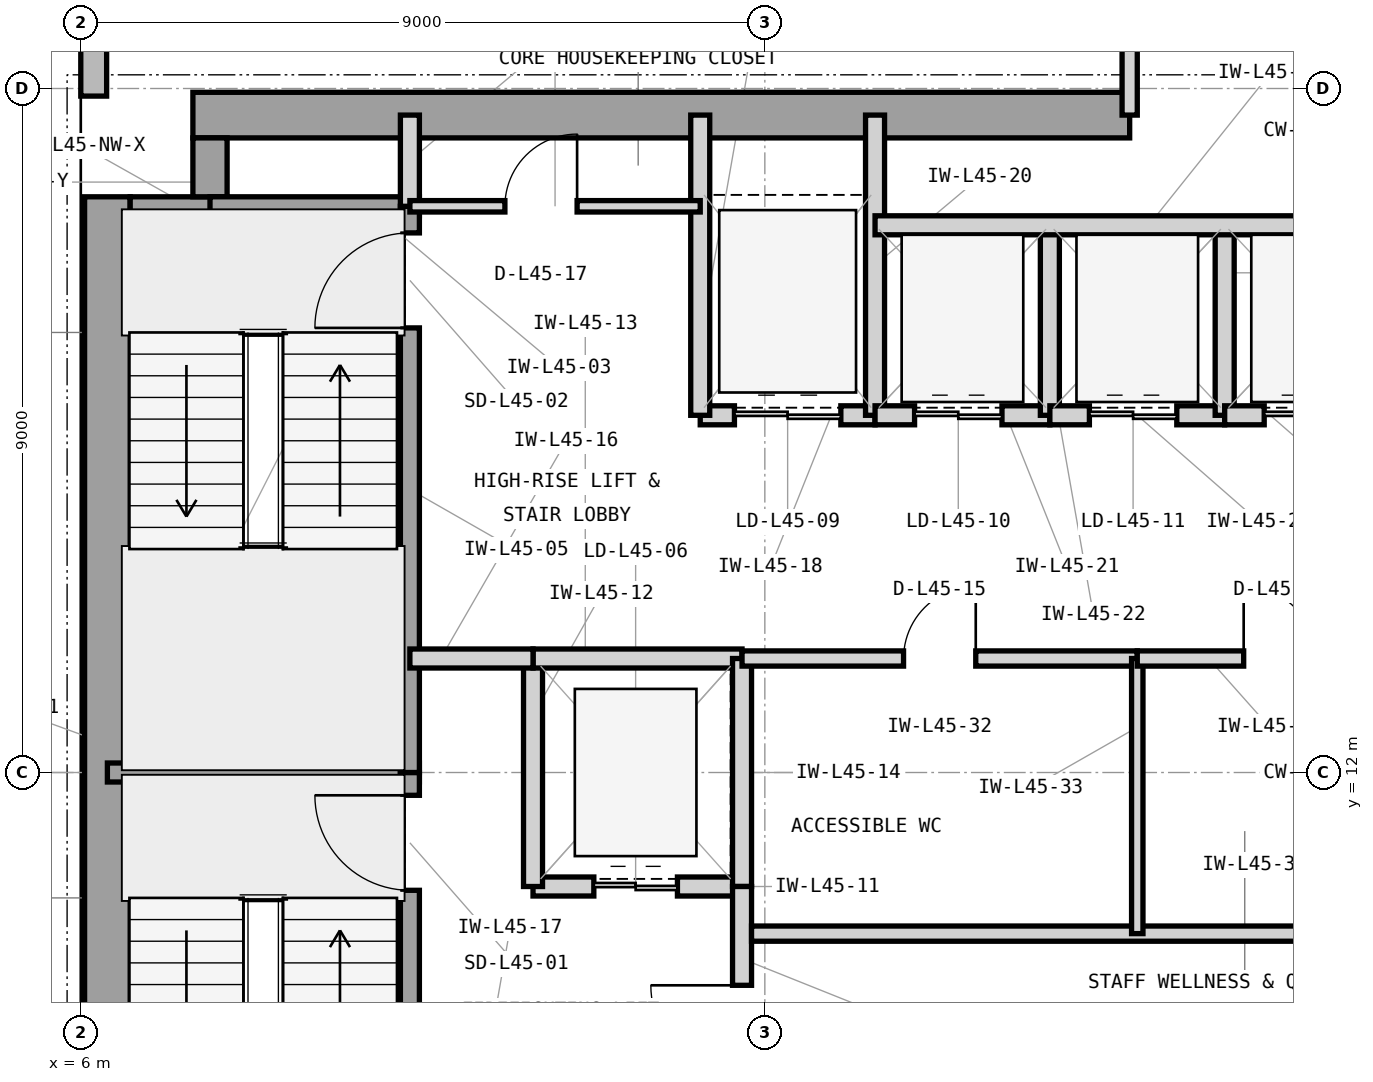
"""IFC4 building model, lengths in metres.
Left out: names, types, materials, properties, quantities, classifications, styles, units other than length and angle.
Written with IfcOpenShell. Run it as: python <this file> out.ifc"""

import sys

from ifc_helpers import new_model, si_unit, direction, frame, frame_2d, origin, place, context, subcontext, project, spatial, rectangle, extrude, element, fill, save


model = new_model("IFC4")
c1 = context("Model", 3, precision=1e-05, world=origin(), true_north=direction((0.0, 1.0)))
c2 = subcontext(c1, "Body", "Model", "MODEL_VIEW")
j1 = project(units=[si_unit("LENGTHUNIT", "METRE"), si_unit("PLANEANGLEUNIT", "RADIAN")], contexts=[c1])
p1 = place(None, origin())
s1 = spatial("IfcSite", under=j1, at=p1, CompositionType="ELEMENT")
p2 = place(p1, origin())
s2 = spatial("IfcBuilding", under=s1, at=p2, CompositionType="ELEMENT")
p3 = place(p2, frame((0.0, 0.0, 187.8)))
s3 = spatial("IfcBuildingStorey", under=s2, at=p3, CompositionType="ELEMENT", Elevation=187.8)
p4 = place(p3, frame((6.35, 4.425, 0.0), z_axis=(0.0, 0.0, 1.0), x_axis=(0.0, 1.0, 0.0)))
e1 = element("IfcWall", 1, at=p4, inside=s3, PredefinedType="SHEAR", context=c2, shape_type="SweptSolid", body=[
    extrude(rectangle(XDim=15.15, YDim=0.6, at=frame_2d((7.575, 0.0))), origin(), (0.0, 0.0, 1.0), 3.9),
])
p5 = place(p3, frame((7.475, 20.65, 0.0), z_axis=(0.0, 0.0, 1.0), x_axis=(1.0, 0.0, 0.0)))
e2 = element("IfcWall", 2, at=p5, inside=s3, PredefinedType="SHEAR", context=c2, shape_type="SweptSolid", body=[
    extrude(rectangle(XDim=12.325, YDim=0.6, at=frame_2d((6.163, 0.0))), origin(), (0.0, 0.0, 1.0), 3.9),
])
p6 = place(p3, frame((6.65, 19.35, 0.0), z_axis=(0.0, 0.0, 1.0), x_axis=(1.0, 0.0, 0.0)))
e3 = element("IfcWall", 3, at=p6, inside=s3, PredefinedType="SHEAR", context=c2, shape_type="SweptSolid", body=[
    extrude(rectangle(XDim=1.275, YDim=0.45, at=frame_2d((0.638, 0.0))), origin(), (0.0, 0.0, 1.0), 3.9),
])
p7 = place(p3, frame((7.7, 19.575, 0.0), z_axis=(0.0, 0.0, 1.0), x_axis=(0.0, 1.0, 0.0)))
e4 = element("IfcWall", 4, at=p7, inside=s3, PredefinedType="SHEAR", context=c2, shape_type="SweptSolid", body=[
    extrude(rectangle(XDim=0.775, YDim=0.45, at=frame_2d((0.388, 0.0))), origin(), (0.0, 0.0, 1.0), 3.9),
])
p8 = place(p3, frame((6.17, 43.4, 0.0), z_axis=(0.0, 0.0, 1.0), x_axis=(0.0, -1.0, 0.0)))
e5 = element("IfcWall", 5, at=p8, inside=s3, PredefinedType="STANDARD", context=c2, shape_type="SweptSolid", body=[
    extrude(rectangle(XDim=22.5, YDim=0.34, at=frame_2d((11.25, 0.0))), origin(), (0.0, 0.0, 1.0), 3.7),
])
p9 = place(p8, frame((10.1, 0.0, 0.9)))
e6 = element("IfcOpeningElement", 6, at=p9, cuts=e5, PredefinedType="OPENING", context=c2, shape_type="SweptSolid", body=[
    extrude(rectangle(XDim=2.3, YDim=2.2, at=frame_2d((1.15, 1.1))), frame((0.0, 0.18, 0.0), z_axis=(0.0, -1.0, 0.0), x_axis=(1.0, 0.0, 0.0)), (0.0, 0.0, 1.0), 0.36),
])
p10 = place(p3, frame((6.35, 12.0, 0.0), z_axis=(0.0, 0.0, 1.0), x_axis=(1.0, 0.0, 0.0)))
e7 = element("IfcWall", 7, at=p10, inside=s3, PredefinedType="SHEAR", context=c2, shape_type="SweptSolid", body=[
    extrude(rectangle(XDim=4.105, YDim=0.25, at=frame_2d((2.052, 0.0))), origin(), (0.0, 0.0, 1.0), 3.9),
])
p11 = place(p3, frame((7.7, 19.45, 0.0), z_axis=(0.0, 0.0, 1.0), x_axis=(1.0, 0.0, 0.0)))
e8 = element("IfcWall", 8, at=p11, inside=s3, PredefinedType="SHEAR", context=c2, shape_type="SweptSolid", body=[
    extrude(rectangle(XDim=2.755, YDim=0.25, at=frame_2d((1.377, 0.0))), origin(), (0.0, 0.0, 1.0), 3.9),
])
p12 = place(p3, frame((10.33, 4.55, 0.0), z_axis=(0.0, 0.0, 1.0), x_axis=(0.0, 1.0, 0.0)))
e9 = element("IfcWall", 9, at=p12, inside=s3, PredefinedType="SHEAR", context=c2, shape_type="SweptSolid", body=[
    extrude(rectangle(XDim=7.45, YDim=0.25, at=frame_2d((3.725, 0.0))), origin(), (0.0, 0.0, 1.0), 3.9),
])
p13 = place(p12, frame((5.9, 0.0, 0.0)))
e10 = element("IfcOpeningElement", 10, at=p13, cuts=e9, PredefinedType="OPENING", context=c2, shape_type="SweptSolid", body=[
    extrude(rectangle(XDim=1.25, YDim=2.2, at=frame_2d((0.625, 1.1))), frame((0.0, 0.135, 0.0), z_axis=(0.0, -1.0, 0.0), x_axis=(1.0, 0.0, 0.0)), (0.0, 0.0, 1.0), 0.27),
])
p14 = place(p3, frame((10.33, 12.0, 0.0), z_axis=(0.0, 0.0, 1.0), x_axis=(0.0, 1.0, 0.0)))
e11 = element("IfcWall", 11, at=p14, inside=s3, PredefinedType="SHEAR", context=c2, shape_type="SweptSolid", body=[
    extrude(rectangle(XDim=7.45, YDim=0.25, at=frame_2d((3.725, 0.0))), origin(), (0.0, 0.0, 1.0), 3.9),
])
p15 = place(p14, frame((5.85, 0.0, 0.0)))
e12 = element("IfcOpeningElement", 12, at=p15, cuts=e11, PredefinedType="OPENING", context=c2, shape_type="SweptSolid", body=[
    extrude(rectangle(XDim=1.25, YDim=2.2, at=frame_2d((0.625, 1.1))), frame((0.0, 0.135, 0.0), z_axis=(0.0, -1.0, 0.0), x_axis=(1.0, 0.0, 0.0)), (0.0, 0.0, 1.0), 0.27),
])
p16 = place(p3, frame((10.33, 19.45, 0.0), z_axis=(0.0, 0.0, 1.0), x_axis=(0.0, 1.0, 0.0)))
e13 = element("IfcWall", 13, at=p16, inside=s3, PredefinedType="PARTITIONING", context=c2, shape_type="SweptSolid", body=[
    extrude(rectangle(XDim=1.2, YDim=0.25, at=frame_2d((0.6, 0.0))), origin(), (0.0, 0.0, 1.0), 3.073),
])
p17 = place(p3, frame((11.95, 10.5, 0.0), z_axis=(0.0, 0.0, 1.0), x_axis=(1.0, 0.0, 0.0)))
e14 = element("IfcWall", 14, at=p17, inside=s3, PredefinedType="PARTITIONING", context=c2, shape_type="SweptSolid", body=[
    extrude(rectangle(XDim=2.75, YDim=0.25, at=frame_2d((1.375, 0.0))), origin(), (0.0, 0.0, 1.0), 3.283),
])
p18 = place(p17, frame((0.8, 0.0, 0.0)))
e15 = element("IfcOpeningElement", 15, at=p18, cuts=e14, PredefinedType="OPENING", context=c2, shape_type="SweptSolid", body=[
    extrude(rectangle(XDim=1.1, YDim=2.25, at=frame_2d((0.55, 1.125))), frame((0.0, 0.135, 0.0), z_axis=(0.0, -1.0, 0.0), x_axis=(1.0, 0.0, 0.0)), (0.0, 0.0, 1.0), 0.27),
])
p19 = place(p3, frame((11.95, 10.5, 0.0), z_axis=(0.0, 0.0, 1.0), x_axis=(0.0, 1.0, 0.0)))
e16 = element("IfcWall", 16, at=p19, inside=s3, PredefinedType="PARTITIONING", context=c2, shape_type="SweptSolid", body=[
    extrude(rectangle(XDim=3.0, YDim=0.25, at=frame_2d((1.5, 0.0))), origin(), (0.0, 0.0, 1.0), 3.69),
])
p20 = place(p3, frame((11.95, 13.5, 0.0), z_axis=(0.0, 0.0, 1.0), x_axis=(1.0, 0.0, 0.0)))
e17 = element("IfcWall", 17, at=p20, inside=s3, PredefinedType="PARTITIONING", context=c2, shape_type="SweptSolid", body=[
    extrude(rectangle(XDim=2.75, YDim=0.25, at=frame_2d((1.375, 0.0))), origin(), (0.0, 0.0, 1.0), 3.283),
])
p21 = place(p3, frame((14.7, 10.5, 0.0), z_axis=(0.0, 0.0, 1.0), x_axis=(0.0, 1.0, 0.0)))
e18 = element("IfcWall", 18, at=p21, inside=s3, PredefinedType="PARTITIONING", context=c2, shape_type="SweptSolid", body=[
    extrude(rectangle(XDim=3.0, YDim=0.25, at=frame_2d((1.5, 0.0))), origin(), (0.0, 0.0, 1.0), 3.69),
])
p22 = place(p3, frame((14.7, 6.7, 0.0), z_axis=(0.0, 0.0, 1.0), x_axis=(0.0, 1.0, 0.0)))
e19 = element("IfcWall", 19, at=p22, inside=s3, PredefinedType="PARTITIONING", context=c2, shape_type="SweptSolid", body=[
    extrude(rectangle(XDim=3.8, YDim=0.25, at=frame_2d((1.9, 0.0))), origin(), (0.0, 0.0, 1.0), 3.69),
])
p23 = place(p22, frame((1.3, 0.0, 0.0)))
e20 = element("IfcOpeningElement", 20, at=p23, cuts=e19, PredefinedType="OPENING", context=c2, shape_type="SweptSolid", body=[
    extrude(rectangle(XDim=1.2, YDim=2.2, at=frame_2d((0.6, 1.1))), frame((0.0, 0.135, 0.0), z_axis=(0.0, -1.0, 0.0), x_axis=(1.0, 0.0, 0.0)), (0.0, 0.0, 1.0), 0.27),
])
p24 = place(p3, frame((10.33, 13.5, 0.0), z_axis=(0.0, 0.0, 1.0), x_axis=(1.0, 0.0, 0.0)))
e21 = element("IfcWall", 21, at=p24, inside=s3, PredefinedType="PARTITIONING", context=c2, shape_type="SweptSolid", body=[
    extrude(rectangle(XDim=1.62, YDim=0.25, at=frame_2d((0.81, 0.0))), origin(), (0.0, 0.0, 1.0), 3.283),
])
p25 = place(p3, frame((14.15, 16.7, 0.0), z_axis=(0.0, 0.0, 1.0), x_axis=(1.0, 0.0, 0.0)))
e22 = element("IfcWall", 22, at=p25, inside=s3, PredefinedType="PARTITIONING", context=c2, shape_type="SweptSolid", body=[
    extrude(rectangle(XDim=2.3, YDim=0.25, at=frame_2d((1.15, 0.0))), origin(), (0.0, 0.0, 1.0), 3.283),
])
p26 = place(p25, frame((0.45, 0.0, 0.0)))
e23 = element("IfcOpeningElement", 23, at=p26, cuts=e22, PredefinedType="OPENING", context=c2, shape_type="SweptSolid", body=[
    extrude(rectangle(XDim=1.4, YDim=2.35, at=frame_2d((0.7, 1.175))), frame((0.0, 0.135, 0.0), z_axis=(0.0, -1.0, 0.0), x_axis=(1.0, 0.0, 0.0)), (0.0, 0.0, 1.0), 0.27),
])
for number, where, z_axis, x_axis in (
    (24, (14.15, 16.7, 0.0), (0.0, 0.0, 1.0), (0.0, 1.0, 0.0)),
    (25, (16.45, 16.7, 0.0), (0.0, 0.0, 1.0), (0.0, 1.0, 0.0)),
):
    element("IfcWall", number, at=place(p3, frame(where, z_axis=z_axis, x_axis=x_axis)), inside=s3, PredefinedType="PARTITIONING", context=c2, shape_type="SweptSolid", body=[
        extrude(rectangle(XDim=3.95, YDim=0.25, at=frame_2d((1.975, 0.0))), origin(), (0.0, 0.0, 1.0), 3.69),
    ])
p27 = place(p3, frame((16.45, 16.7, 0.0), z_axis=(0.0, 0.0, 1.0), x_axis=(1.0, 0.0, 0.0)))
e26 = element("IfcWall", 26, at=p27, inside=s3, PredefinedType="PARTITIONING", context=c2, shape_type="SweptSolid", body=[
    extrude(rectangle(XDim=2.3, YDim=0.25, at=frame_2d((1.15, 0.0))), origin(), (0.0, 0.0, 1.0), 3.283),
])
p28 = place(p27, frame((0.52, 0.0, 0.0)))
e27 = element("IfcOpeningElement", 27, at=p28, cuts=e26, PredefinedType="OPENING", context=c2, shape_type="SweptSolid", body=[
    extrude(rectangle(XDim=1.15, YDim=2.25, at=frame_2d((0.575, 1.125))), frame((0.0, 0.135, 0.0), z_axis=(0.0, -1.0, 0.0), x_axis=(1.0, 0.0, 0.0)), (0.0, 0.0, 1.0), 0.27),
])
p29 = place(p3, frame((18.75, 16.7, 0.0), z_axis=(0.0, 0.0, 1.0), x_axis=(0.0, 1.0, 0.0)))
e28 = element("IfcWall", 28, at=p29, inside=s3, PredefinedType="PARTITIONING", context=c2, shape_type="SweptSolid", body=[
    extrude(rectangle(XDim=2.5, YDim=0.25, at=frame_2d((1.25, 0.0))), origin(), (0.0, 0.0, 1.0), 3.69),
])
p30 = place(p3, frame((18.75, 16.7, 0.0), z_axis=(0.0, 0.0, 1.0), x_axis=(1.0, 0.0, 0.0)))
e29 = element("IfcWall", 29, at=p30, inside=s3, PredefinedType="PARTITIONING", context=c2, shape_type="SweptSolid", body=[
    extrude(rectangle(XDim=2.3, YDim=0.25, at=frame_2d((1.15, 0.0))), origin(), (0.0, 0.0, 1.0), 3.283),
])
p31 = place(p30, frame((0.52, 0.0, 0.0)))
e30 = element("IfcOpeningElement", 30, at=p31, cuts=e29, PredefinedType="OPENING", context=c2, shape_type="SweptSolid", body=[
    extrude(rectangle(XDim=1.15, YDim=2.25, at=frame_2d((0.575, 1.125))), frame((0.0, 0.135, 0.0), z_axis=(0.0, -1.0, 0.0), x_axis=(1.0, 0.0, 0.0)), (0.0, 0.0, 1.0), 0.27),
])
p32 = place(p3, frame((21.05, 16.7, 0.0), z_axis=(0.0, 0.0, 1.0), x_axis=(0.0, 1.0, 0.0)))
e31 = element("IfcWall", 31, at=p32, inside=s3, PredefinedType="PARTITIONING", context=c2, shape_type="SweptSolid", body=[
    extrude(rectangle(XDim=2.5, YDim=0.25, at=frame_2d((1.25, 0.0))), origin(), (0.0, 0.0, 1.0), 3.69),
])
p33 = place(p3, frame((21.05, 16.7, 0.0), z_axis=(0.0, 0.0, 1.0), x_axis=(1.0, 0.0, 0.0)))
e32 = element("IfcWall", 32, at=p33, inside=s3, PredefinedType="PARTITIONING", context=c2, shape_type="SweptSolid", body=[
    extrude(rectangle(XDim=2.4, YDim=0.25, at=frame_2d((1.2, 0.0))), origin(), (0.0, 0.0, 1.0), 3.283),
])
p34 = place(p33, frame((0.52, 0.0, 0.0)))
e33 = element("IfcOpeningElement", 33, at=p34, cuts=e32, PredefinedType="OPENING", context=c2, shape_type="SweptSolid", body=[
    extrude(rectangle(XDim=1.15, YDim=2.25, at=frame_2d((0.575, 1.125))), frame((0.0, 0.135, 0.0), z_axis=(0.0, -1.0, 0.0), x_axis=(1.0, 0.0, 0.0)), (0.0, 0.0, 1.0), 0.27),
])
p35 = place(p3, frame((16.45, 19.2, 0.0), z_axis=(0.0, 0.0, 1.0), x_axis=(1.0, 0.0, 0.0)))
e34 = element("IfcWall", 34, at=p35, inside=s3, PredefinedType="PARTITIONING", context=c2, shape_type="SweptSolid", body=[
    extrude(rectangle(XDim=7.2, YDim=0.25, at=frame_2d((3.6, 0.0))), origin(), (0.0, 0.0, 1.0), 3.69),
])
p36 = place(p3, frame((14.825, 9.88, 0.0), z_axis=(0.0, 0.0, 1.0), x_axis=(1.0, 0.0, 0.0)))
e35 = element("IfcWall", 35, at=p36, inside=s3, PredefinedType="PARTITIONING", context=c2, shape_type="SweptSolid", body=[
    extrude(rectangle(XDim=8.825, YDim=0.2, at=frame_2d((4.413, 0.0))), origin(), (0.0, 0.0, 1.0), 3.69),
])
p37 = place(p3, frame((14.7, 13.5, 0.0), z_axis=(0.0, 0.0, 1.0), x_axis=(1.0, 0.0, 0.0)))
e36 = element("IfcWall", 36, at=p37, inside=s3, PredefinedType="PARTITIONING", context=c2, shape_type="SweptSolid", body=[
    extrude(rectangle(XDim=5.2, YDim=0.2, at=frame_2d((2.6, 0.0))), origin(), (0.0, 0.0, 1.0), 3.283),
])
p38 = place(p37, frame((2.125, 0.0, 0.0)))
e37 = element("IfcOpeningElement", 37, at=p38, cuts=e36, PredefinedType="OPENING", context=c2, shape_type="SweptSolid", body=[
    extrude(rectangle(XDim=0.95, YDim=2.1, at=frame_2d((0.475, 1.05))), frame((0.0, 0.11, 0.0), z_axis=(0.0, -1.0, 0.0), x_axis=(1.0, 0.0, 0.0)), (0.0, 0.0, 1.0), 0.22),
])
p39 = place(p3, frame((19.9, 9.88, 0.0), z_axis=(0.0, 0.0, 1.0), x_axis=(0.0, 1.0, 0.0)))
e38 = element("IfcWall", 38, at=p39, inside=s3, PredefinedType="PARTITIONING", context=c2, shape_type="SweptSolid", body=[
    extrude(rectangle(XDim=3.62, YDim=0.15, at=frame_2d((1.81, 0.0))), origin(), (0.0, 0.0, 1.0), 3.69),
])
p40 = place(p3, frame((19.9, 13.5, 0.0), z_axis=(0.0, 0.0, 1.0), x_axis=(1.0, 0.0, 0.0)))
e39 = element("IfcWall", 39, at=p40, inside=s3, PredefinedType="PARTITIONING", context=c2, shape_type="SweptSolid", body=[
    extrude(rectangle(XDim=3.75, YDim=0.2, at=frame_2d((1.875, 0.0))), origin(), (0.0, 0.0, 1.0), 3.283),
])
p41 = place(p40, frame((1.4, 0.0, 0.0)))
e40 = element("IfcOpeningElement", 40, at=p41, cuts=e39, PredefinedType="OPENING", context=c2, shape_type="SweptSolid", body=[
    extrude(rectangle(XDim=0.95, YDim=2.1, at=frame_2d((0.475, 1.05))), frame((0.0, 0.11, 0.0), z_axis=(0.0, -1.0, 0.0), x_axis=(1.0, 0.0, 0.0)), (0.0, 0.0, 1.0), 0.22),
])
p42 = place(p3, frame((10.33, 19.45, 0.0), z_axis=(0.0, 0.0, 1.0), x_axis=(1.0, 0.0, 0.0)))
e41 = element("IfcWall", 41, at=p42, inside=s3, PredefinedType="PARTITIONING", context=c2, shape_type="SweptSolid", body=[
    extrude(rectangle(XDim=3.82, YDim=0.15, at=frame_2d((1.91, 0.0))), origin(), (0.0, 0.0, 1.0), 3.69),
])
p43 = place(p42, frame((1.25, 0.0, 0.0)))
e42 = element("IfcOpeningElement", 42, at=p43, cuts=e41, PredefinedType="OPENING", context=c2, shape_type="SweptSolid", body=[
    extrude(rectangle(XDim=0.95, YDim=2.1, at=frame_2d((0.475, 1.05))), frame((0.0, 0.085, 0.0), z_axis=(0.0, -1.0, 0.0), x_axis=(1.0, 0.0, 0.0)), (0.0, 0.0, 1.0), 0.17),
])
p44 = place(p3, frame((19.8, 20.65, 0.0), z_axis=(0.0, 0.0, 1.0), x_axis=(0.0, 1.0, 0.0)))
e43 = element("IfcWall", 43, at=p44, inside=s3, PredefinedType="PARTITIONING", context=c2, shape_type="SweptSolid", body=[
    extrude(rectangle(XDim=6.15, YDim=0.2, at=frame_2d((3.075, 0.0))), origin(), (0.0, 0.0, 1.0), 3.69),
])
p45 = place(p13, origin())
e44 = element("IfcDoor", 44, at=p45, inside=s3, OperationType="SINGLE_SWING_RIGHT", PredefinedType="DOOR", context=c2, shape_type="SweptSolid", body=[
    extrude(rectangle(XDim=1.25, YDim=2.2, at=frame_2d((0.625, 1.1))), frame((0.0, 0.025, 0.0), z_axis=(0.0, -1.0, 0.0), x_axis=(1.0, 0.0, 0.0)), (0.0, 0.0, 1.0), 0.05),
])
fill(e10, e44)
p46 = place(p15, origin())
e45 = element("IfcDoor", 45, at=p46, inside=s3, OperationType="SINGLE_SWING_LEFT", PredefinedType="DOOR", context=c2, shape_type="SweptSolid", body=[
    extrude(rectangle(XDim=1.25, YDim=2.2, at=frame_2d((0.625, 1.1))), frame((0.0, 0.025, 0.0), z_axis=(0.0, -1.0, 0.0), x_axis=(1.0, 0.0, 0.0)), (0.0, 0.0, 1.0), 0.05),
])
fill(e12, e45)
p47 = place(p18, origin())
e46 = element("IfcDoor", 46, at=p47, inside=s3, OperationType="DOUBLE_DOOR_SLIDING", PredefinedType="DOOR", context=c2, shape_type="SweptSolid", body=[
    extrude(rectangle(XDim=1.1, YDim=2.25, at=frame_2d((0.55, 1.125))), frame((0.0, 0.025, 0.0), z_axis=(0.0, -1.0, 0.0), x_axis=(1.0, 0.0, 0.0)), (0.0, 0.0, 1.0), 0.05),
])
fill(e15, e46)
p48 = place(p23, origin())
e47 = element("IfcDoor", 47, at=p48, inside=s3, OperationType="SINGLE_SWING_RIGHT", PredefinedType="DOOR", context=c2, shape_type="SweptSolid", body=[
    extrude(rectangle(XDim=1.2, YDim=2.2, at=frame_2d((0.6, 1.1))), frame((0.0, 0.025, 0.0), z_axis=(0.0, -1.0, 0.0), x_axis=(1.0, 0.0, 0.0)), (0.0, 0.0, 1.0), 0.05),
])
fill(e20, e47)
p49 = place(p26, origin())
e48 = element("IfcDoor", 48, at=p49, inside=s3, OperationType="DOUBLE_DOOR_SLIDING", PredefinedType="DOOR", context=c2, shape_type="SweptSolid", body=[
    extrude(rectangle(XDim=1.4, YDim=2.35, at=frame_2d((0.7, 1.175))), frame((0.0, 0.025, 0.0), z_axis=(0.0, -1.0, 0.0), x_axis=(1.0, 0.0, 0.0)), (0.0, 0.0, 1.0), 0.05),
])
fill(e23, e48)
p50 = place(p28, origin())
e49 = element("IfcDoor", 49, at=p50, inside=s3, OperationType="DOUBLE_DOOR_SLIDING", PredefinedType="DOOR", context=c2, shape_type="SweptSolid", body=[
    extrude(rectangle(XDim=1.15, YDim=2.25, at=frame_2d((0.575, 1.125))), frame((0.0, 0.025, 0.0), z_axis=(0.0, -1.0, 0.0), x_axis=(1.0, 0.0, 0.0)), (0.0, 0.0, 1.0), 0.05),
])
fill(e27, e49)
p51 = place(p31, origin())
e50 = element("IfcDoor", 50, at=p51, inside=s3, OperationType="DOUBLE_DOOR_SLIDING", PredefinedType="DOOR", context=c2, shape_type="SweptSolid", body=[
    extrude(rectangle(XDim=1.15, YDim=2.25, at=frame_2d((0.575, 1.125))), frame((0.0, 0.025, 0.0), z_axis=(0.0, -1.0, 0.0), x_axis=(1.0, 0.0, 0.0)), (0.0, 0.0, 1.0), 0.05),
])
fill(e30, e50)
p52 = place(p34, origin())
e51 = element("IfcDoor", 51, at=p52, inside=s3, OperationType="DOUBLE_DOOR_SLIDING", PredefinedType="DOOR", context=c2, shape_type="SweptSolid", body=[
    extrude(rectangle(XDim=1.15, YDim=2.25, at=frame_2d((0.575, 1.125))), frame((0.0, 0.025, 0.0), z_axis=(0.0, -1.0, 0.0), x_axis=(1.0, 0.0, 0.0)), (0.0, 0.0, 1.0), 0.05),
])
fill(e33, e51)
p53 = place(p38, origin())
e52 = element("IfcDoor", 52, at=p53, inside=s3, OperationType="SINGLE_SWING_RIGHT", PredefinedType="DOOR", context=c2, shape_type="SweptSolid", body=[
    extrude(rectangle(XDim=0.95, YDim=2.1, at=frame_2d((0.475, 1.05))), frame((0.0, 0.025, 0.0), z_axis=(0.0, -1.0, 0.0), x_axis=(1.0, 0.0, 0.0)), (0.0, 0.0, 1.0), 0.05),
])
fill(e37, e52)
p54 = place(p41, origin())
e53 = element("IfcDoor", 53, at=p54, inside=s3, OperationType="SINGLE_SWING_LEFT", PredefinedType="DOOR", context=c2, shape_type="SweptSolid", body=[
    extrude(rectangle(XDim=0.95, YDim=2.1, at=frame_2d((0.475, 1.05))), frame((0.0, 0.025, 0.0), z_axis=(0.0, -1.0, 0.0), x_axis=(1.0, 0.0, 0.0)), (0.0, 0.0, 1.0), 0.05),
])
fill(e40, e53)
p55 = place(p43, origin())
e54 = element("IfcDoor", 54, at=p55, inside=s3, OperationType="SINGLE_SWING_RIGHT", PredefinedType="DOOR", context=c2, shape_type="SweptSolid", body=[
    extrude(rectangle(XDim=0.95, YDim=2.1, at=frame_2d((0.475, 1.05))), frame((0.0, 0.025, 0.0), z_axis=(0.0, -1.0, 0.0), x_axis=(1.0, 0.0, 0.0)), (0.0, 0.0, 1.0), 0.05),
])
fill(e42, e54)
save(model, sys.argv[1])
